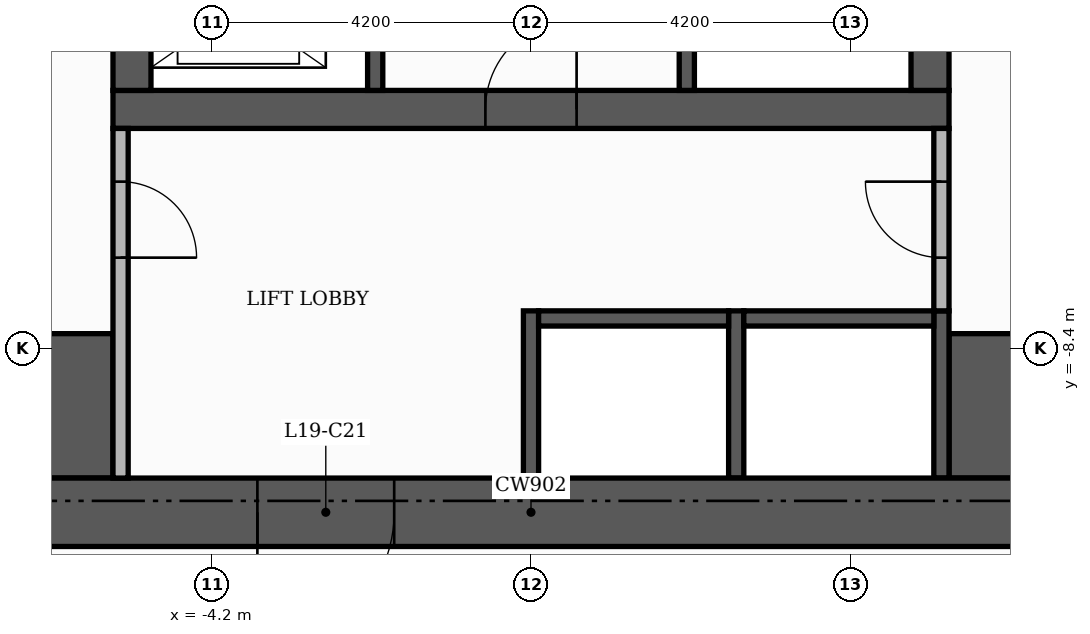
"""IFC4 building model, lengths in metres.
Left out: names, types, materials, properties, quantities, classifications, styles, units other than length and angle.
Written with IfcOpenShell. Run it as: python <this file> out.ifc"""

import sys

from ifc_helpers import new_model, si_unit, direction, frame, frame_2d, origin, place, context, subcontext, project, spatial, rectangle, extrude, element, fill, save


model = new_model("IFC4")
c1 = context("Model", 3, precision=1e-05, world=origin(), true_north=direction((0.0, 1.0)))
c2 = subcontext(c1, "Body", "Model", "MODEL_VIEW")
j1 = project(units=[si_unit("LENGTHUNIT", "METRE"), si_unit("PLANEANGLEUNIT", "RADIAN")], contexts=[c1])
p1 = place(None, origin())
s1 = spatial("IfcSite", under=j1, at=p1, CompositionType="ELEMENT")
p2 = place(p1, origin())
s2 = spatial("IfcBuilding", under=s1, at=p2, CompositionType="ELEMENT")
p3 = place(p2, frame((0.0, 0.0, 83.1)))
s3 = spatial("IfcBuildingStorey", under=s2, at=p3, CompositionType="ELEMENT", Elevation=83.1)
p4 = place(p3, frame((-5.5, -5.25, 0.0), z_axis=(0.0, 0.0, 1.0), x_axis=(1.0, 0.0, 0.0)))
e1 = element("IfcWall", 1, at=p4, inside=s3, PredefinedType="SHEAR", context=c2, shape_type="SweptSolid", body=[
    extrude(rectangle(XDim=11.0, YDim=0.5, at=frame_2d((5.5, 0.0))), origin(), (0.0, 0.0, 1.0), 3.48),
])
p5 = place(p4, frame((4.9, 0.0, 0.0)))
e2 = element("IfcOpeningElement", 2, at=p5, cuts=e1, PredefinedType="OPENING", context=c2, shape_type="SweptSolid", body=[
    extrude(rectangle(XDim=1.2, YDim=2.1, at=frame_2d((0.6, 1.05))), frame((0.0, 0.26, 0.0), z_axis=(0.0, -1.0, 0.0), x_axis=(1.0, 0.0, 0.0)), (0.0, 0.0, 1.0), 0.52),
])
for number, where, z_axis, x_axis in (
    (3, (-5.25, -5.0, 0.0), (0.0, 0.0, 1.0), (0.0, 1.0, 0.0)),
    (4, (5.25, -5.0, 0.0), (0.0, 0.0, 1.0), (0.0, 1.0, 0.0)),
):
    element("IfcWall", number, at=place(p3, frame(where, z_axis=z_axis, x_axis=x_axis)), inside=s3, PredefinedType="SHEAR", context=c2, shape_type="SweptSolid", body=[
        extrude(rectangle(XDim=10.5, YDim=0.5, at=frame_2d((5.25, 0.0))), origin(), (0.0, 0.0, 1.0), 3.48),
    ])
for number, where, z_axis, x_axis in (
    (5, (-10.1, -9.15, 0.0), (0.0, 0.0, 1.0), (1.0, 0.0, 0.0)),
    (6, (5.5, -9.15, 0.0), (0.0, 0.0, 1.0), (1.0, 0.0, 0.0)),
):
    element("IfcWall", number, at=place(p3, frame(where, z_axis=z_axis, x_axis=x_axis)), inside=s3, PredefinedType="SHEAR", context=c2, shape_type="SweptSolid", body=[
        extrude(rectangle(XDim=4.6, YDim=1.9, at=frame_2d((2.3, 0.0))), origin(), (0.0, 0.0, 1.0), 3.48),
    ])
p6 = place(p3, frame((2.05, -5.0, 0.0), z_axis=(0.0, 0.0, 1.0), x_axis=(0.0, 1.0, 0.0)))
e7 = element("IfcWall", 7, at=p6, inside=s3, PredefinedType="SHEAR", context=c2, shape_type="SweptSolid", body=[
    extrude(rectangle(XDim=6.6, YDim=0.2, at=frame_2d((3.3, 0.0))), origin(), (0.0, 0.0, 1.0), 3.48),
])
p7 = place(p6, frame((5.25, 0.0, 0.0)))
e8 = element("IfcOpeningElement", 8, at=p7, cuts=e7, PredefinedType="OPENING", context=c2, shape_type="SweptSolid", body=[
    extrude(rectangle(XDim=1.0, YDim=2.1, at=frame_2d((0.5, 1.05))), frame((0.0, 0.11, 0.0), z_axis=(0.0, -1.0, 0.0), x_axis=(1.0, 0.0, 0.0)), (0.0, 0.0, 1.0), 0.22),
])
for number, where, z_axis, x_axis in (
    (9, (0.0, -10.1, 0.0), (0.0, 0.0, 1.0), (0.0, 1.0, 0.0)),
    (10, (2.7, -10.1, 0.0), (0.0, 0.0, 1.0), (0.0, 1.0, 0.0)),
    (11, (5.4, -10.1, 0.0), (0.0, 0.0, 1.0), (0.0, 1.0, 0.0)),
):
    element("IfcWall", number, at=place(p3, frame(where, z_axis=z_axis, x_axis=x_axis)), inside=s3, PredefinedType="SHEAR", context=c2, shape_type="SweptSolid", body=[
        extrude(rectangle(XDim=2.2, YDim=0.2, at=frame_2d((1.1, 0.0))), origin(), (0.0, 0.0, 1.0), 3.48),
    ])
for number, where, z_axis, x_axis in (
    (12, (0.1, -8.0, 0.0), (0.0, 0.0, 1.0), (1.0, 0.0, 0.0)),
    (13, (2.8, -8.0, 0.0), (0.0, 0.0, 1.0), (1.0, 0.0, 0.0)),
):
    element("IfcWall", number, at=place(p3, frame(where, z_axis=z_axis, x_axis=x_axis)), inside=s3, PredefinedType="SHEAR", context=c2, shape_type="SweptSolid", body=[
        extrude(rectangle(XDim=2.5, YDim=0.2, at=frame_2d((1.25, 0.0))), origin(), (0.0, 0.0, 1.0), 3.48),
    ])
p8 = place(p3, frame((-2.05, -5.0, 0.0), z_axis=(0.0, 0.0, 1.0), x_axis=(0.0, 1.0, 0.0)))
e14 = element("IfcWall", 14, at=p8, inside=s3, PredefinedType="SHEAR", context=c2, shape_type="SweptSolid", body=[
    extrude(rectangle(XDim=3.4, YDim=0.2, at=frame_2d((1.7, 0.0))), origin(), (0.0, 0.0, 1.0), 3.48),
])
p9 = place(p8, frame((0.55, 0.0, 0.0)))
e15 = element("IfcOpeningElement", 15, at=p9, cuts=e14, PredefinedType="OPENING", context=c2, shape_type="SweptSolid", body=[
    extrude(rectangle(XDim=1.1, YDim=2.1, at=frame_2d((0.55, 1.05))), frame((0.0, 0.11, 0.0), z_axis=(0.0, -1.0, 0.0), x_axis=(1.0, 0.0, 0.0)), (0.0, 0.0, 1.0), 0.22),
])
p10 = place(p8, frame((2.45, 0.0, 0.0)))
e16 = element("IfcOpeningElement", 16, at=p10, cuts=e14, PredefinedType="OPENING", context=c2, shape_type="SweptSolid", body=[
    extrude(rectangle(XDim=0.8, YDim=2.1, at=frame_2d((0.4, 1.05))), frame((0.0, 0.11, 0.0), z_axis=(0.0, -1.0, 0.0), x_axis=(1.0, 0.0, 0.0)), (0.0, 0.0, 1.0), 0.22),
])
p11 = place(p3, frame((-11.0, -10.55, 0.0), z_axis=(0.0, 0.0, 1.0), x_axis=(1.0, 0.0, 0.0)))
e17 = element("IfcWall", 17, at=p11, inside=s3, PredefinedType="SHEAR", context=c2, shape_type="SweptSolid", body=[
    extrude(rectangle(XDim=22.0, YDim=0.9, at=frame_2d((11.0, 0.0))), origin(), (0.0, 0.0, 1.0), 3.48),
])
p12 = place(p11, frame((7.4, 0.0, 0.0)))
e18 = element("IfcOpeningElement", 18, at=p12, cuts=e17, PredefinedType="OPENING", context=c2, shape_type="SweptSolid", body=[
    extrude(rectangle(XDim=1.8, YDim=2.2, at=frame_2d((0.9, 1.1))), frame((0.0, 0.46, 0.0), z_axis=(0.0, -1.0, 0.0), x_axis=(1.0, 0.0, 0.0)), (0.0, 0.0, 1.0), 0.92),
])
p13 = place(p3, frame((-5.4, -10.1, 0.0), z_axis=(0.0, 0.0, 1.0), x_axis=(0.0, 1.0, 0.0)))
e19 = element("IfcWall", 19, at=p13, inside=s3, PredefinedType="PARTITIONING", context=c2, shape_type="SweptSolid", body=[
    extrude(rectangle(XDim=4.6, YDim=0.2, at=frame_2d((2.3, 0.0))), origin(), (0.0, 0.0, 1.0), 3.48),
])
p14 = place(p13, frame((2.9, 0.0, 0.0)))
e20 = element("IfcOpeningElement", 20, at=p14, cuts=e19, PredefinedType="OPENING", context=c2, shape_type="SweptSolid", body=[
    extrude(rectangle(XDim=1.0, YDim=2.1, at=frame_2d((0.5, 1.05))), frame((0.0, 0.11, 0.0), z_axis=(0.0, -1.0, 0.0), x_axis=(1.0, 0.0, 0.0)), (0.0, 0.0, 1.0), 0.22),
])
p15 = place(p3, frame((5.4, -7.9, 0.0), z_axis=(0.0, 0.0, 1.0), x_axis=(0.0, 1.0, 0.0)))
e21 = element("IfcWall", 21, at=p15, inside=s3, PredefinedType="PARTITIONING", context=c2, shape_type="SweptSolid", body=[
    extrude(rectangle(XDim=2.4, YDim=0.2, at=frame_2d((1.2, 0.0))), origin(), (0.0, 0.0, 1.0), 3.48),
])
p16 = place(p15, frame((0.7, 0.0, 0.0)))
e22 = element("IfcOpeningElement", 22, at=p16, cuts=e21, PredefinedType="OPENING", context=c2, shape_type="SweptSolid", body=[
    extrude(rectangle(XDim=1.0, YDim=2.1, at=frame_2d((0.5, 1.05))), frame((0.0, 0.11, 0.0), z_axis=(0.0, -1.0, 0.0), x_axis=(1.0, 0.0, 0.0)), (0.0, 0.0, 1.0), 0.22),
])
p17 = place(p5, origin())
e23 = element("IfcDoor", 23, at=p17, inside=s3, OperationType="SINGLE_SWING_RIGHT", PredefinedType="DOOR", context=c2, shape_type="SweptSolid", body=[
    extrude(rectangle(XDim=1.2, YDim=2.1, at=frame_2d((0.6, 1.05))), frame((0.0, 0.025, 0.0), z_axis=(0.0, -1.0, 0.0), x_axis=(1.0, 0.0, 0.0)), (0.0, 0.0, 1.0), 0.05),
])
fill(e2, e23)
p18 = place(p14, frame((1.0, 0.0, 0.0), z_axis=(0.0, 0.0, 1.0), x_axis=(-1.0, 0.0, 0.0)))
e24 = element("IfcDoor", 24, at=p18, inside=s3, OperationType="SINGLE_SWING_LEFT", PredefinedType="DOOR", context=c2, shape_type="SweptSolid", body=[
    extrude(rectangle(XDim=1.0, YDim=2.1, at=frame_2d((0.5, 1.05))), frame((0.0, 0.025, 0.0), z_axis=(0.0, -1.0, 0.0), x_axis=(1.0, 0.0, 0.0)), (0.0, 0.0, 1.0), 0.05),
])
fill(e20, e24)
p19 = place(p16, origin())
e25 = element("IfcDoor", 25, at=p19, inside=s3, OperationType="SINGLE_SWING_RIGHT", PredefinedType="DOOR", context=c2, shape_type="SweptSolid", body=[
    extrude(rectangle(XDim=1.0, YDim=2.1, at=frame_2d((0.5, 1.05))), frame((0.0, 0.025, 0.0), z_axis=(0.0, -1.0, 0.0), x_axis=(1.0, 0.0, 0.0)), (0.0, 0.0, 1.0), 0.05),
])
fill(e22, e25)
p20 = place(p12, frame((1.8, 0.0, 0.0), z_axis=(0.0, 0.0, 1.0), x_axis=(-1.0, 0.0, 0.0)))
e26 = element("IfcDoor", 26, at=p20, inside=s3, OperationType="DOUBLE_DOOR_SINGLE_SWING", PredefinedType="DOOR", context=c2, shape_type="SweptSolid", body=[
    extrude(rectangle(XDim=1.8, YDim=2.2, at=frame_2d((0.9, 1.1))), frame((0.0, 0.025, 0.0), z_axis=(0.0, -1.0, 0.0), x_axis=(1.0, 0.0, 0.0)), (0.0, 0.0, 1.0), 0.05),
])
fill(e18, e26)
save(model, sys.argv[1])
